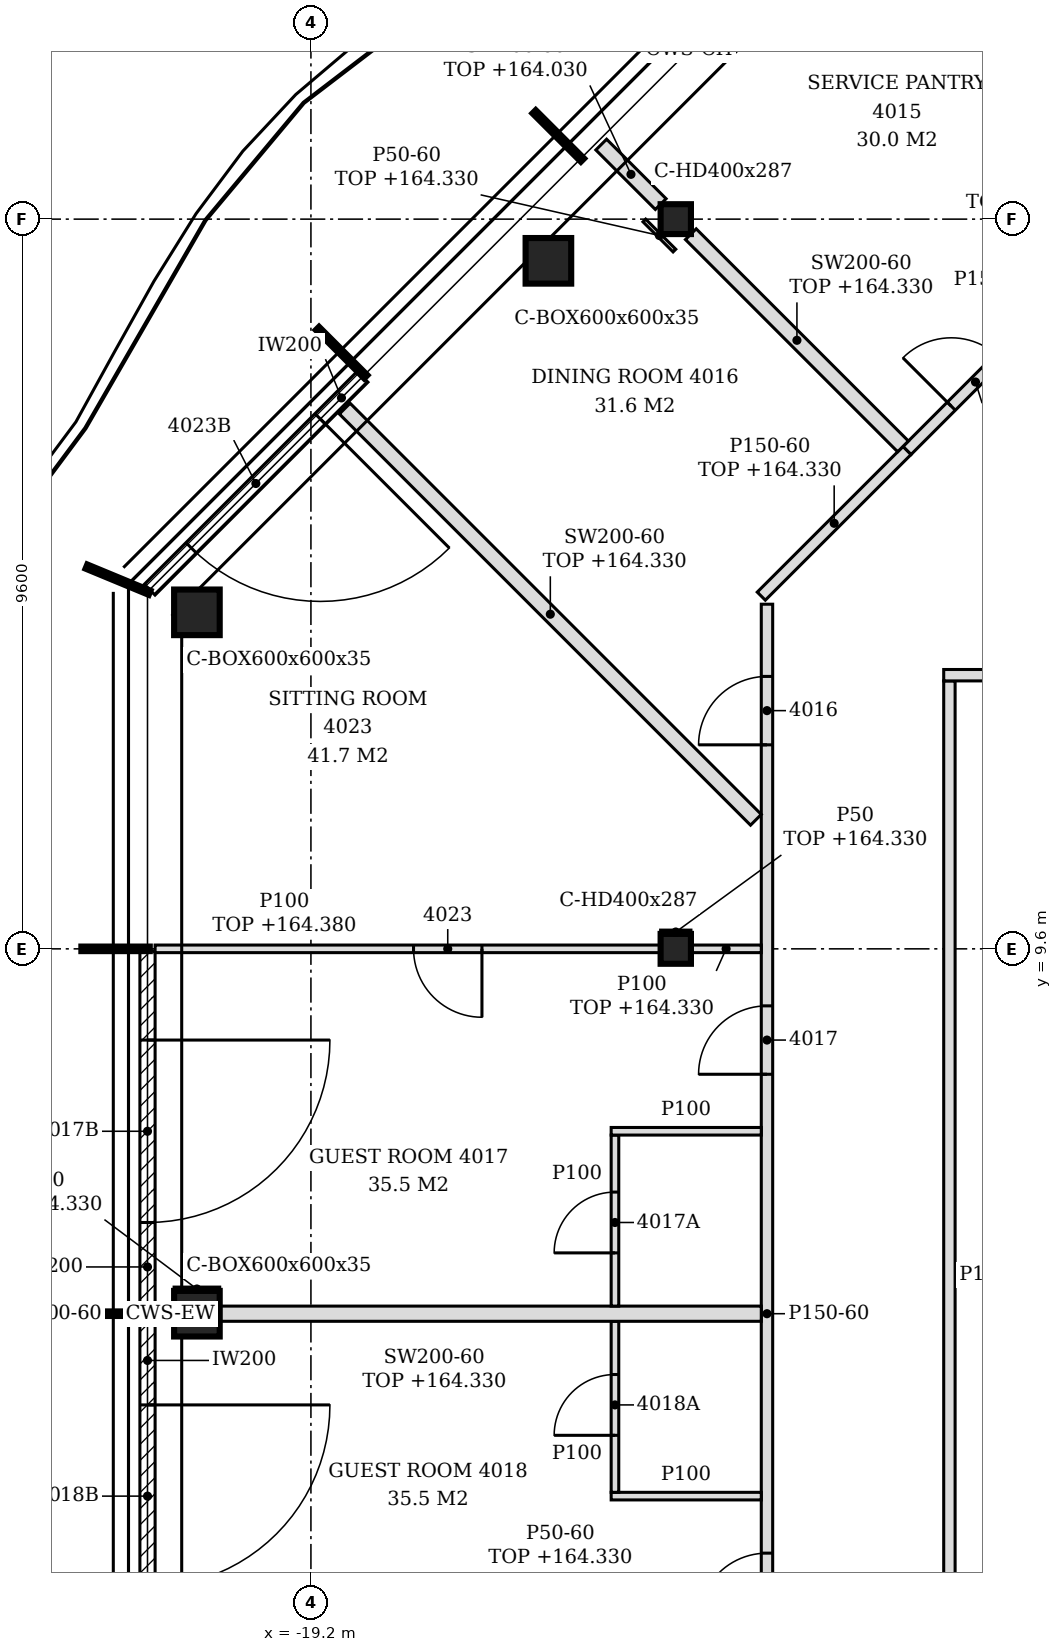
"""IFC4 building model, lengths in metres.
Left out: names, types, materials, properties, quantities, classifications, styles, units other than length and angle.
Written with IfcOpenShell. Run it as: python <this file> out.ifc"""

import sys

from ifc_helpers import new_model, si_unit, direction, frame, frame_2d, origin, origin_2d, place, context, subcontext, project, spatial, polyline, rectangle, hollow_rectangle, i_section, outline, extrude, element, fill, save


model = new_model("IFC4")
c1 = context("Model", 3, precision=1e-05, world=origin(), true_north=direction((0.0, 1.0)))
c2 = subcontext(c1, "Body", "Model", "MODEL_VIEW")
j1 = project(units=[si_unit("LENGTHUNIT", "METRE"), si_unit("PLANEANGLEUNIT", "RADIAN")], contexts=[c1])
p1 = place(None, origin())
s1 = spatial("IfcSite", under=j1, at=p1, CompositionType="ELEMENT")
p2 = place(p1, origin())
s2 = spatial("IfcBuilding", under=s1, at=p2, CompositionType="ELEMENT")
p3 = place(p2, frame((0.0, 0.0, 161.4)))
s3 = spatial("IfcBuildingStorey", under=s2, at=p3, CompositionType="ELEMENT", Elevation=161.4)
for number, where, z_axis, x_axis in (
    (1, (-16.076, 18.652, -0.15), (0.0, 0.0, 1.0), (1.0, 0.0, 0.0)),
    (2, (-20.7, 14.027, -0.15), (0.0, 0.0, 1.0), (1.0, 0.0, 0.0)),
    (3, (-20.7, 4.8, -0.15), (0.0, 0.0, 1.0), (1.0, 0.0, 0.0)),
):
    element("IfcColumn", number, at=place(p3, frame(where, z_axis=z_axis, x_axis=x_axis)), inside=s3, PredefinedType="COLUMN", context=c2, shape_type="SweptSolid", body=[
        extrude(hollow_rectangle(XDim=0.6, YDim=0.6, WallThickness=0.035, at=origin_2d()), origin(), (0.0, 0.0, 1.0), 3.6),
    ])
for number, where, z_axis, x_axis in (
    (4, (-14.4, 9.6, -0.15), (0.0, 0.0, 1.0), (1.0, 0.0, 0.0)),
    (5, (-14.4, 19.2, -0.15), (0.0, 0.0, 1.0), (1.0, 0.0, 0.0)),
):
    element("IfcColumn", number, at=place(p3, frame(where, z_axis=z_axis, x_axis=x_axis)), inside=s3, PredefinedType="COLUMN", context=c2, shape_type="SweptSolid", body=[
        extrude(i_section(OverallWidth=0.399, OverallDepth=0.393, WebThickness=0.023, FlangeThickness=0.037, FilletRadius=0.015, at=origin_2d()), origin(), (0.0, 0.0, 1.0), 3.6),
    ])
p4 = place(p3, frame((-18.521, 17.126, 0.0), z_axis=(0.0, 0.0, 1.0), x_axis=(-0.707106781187, -0.707106781187, 0.0)))
e6 = element("IfcWall", 6, at=p4, inside=s3, PredefinedType="NOTDEFINED", context=c2, shape_type="SweptSolid", body=[
    extrude(rectangle(XDim=3.962, YDim=0.2, at=frame_2d((1.981, 0.0))), origin(), (0.0, 0.0, 1.0), 3.45),
])
p5 = place(p4, frame((0.785, 0.0, 0.0)))
e7 = element("IfcOpeningElement", 7, at=p5, cuts=e6, PredefinedType="OPENING", context=c2, shape_type="SweptSolid", body=[
    extrude(rectangle(XDim=2.4, YDim=2.4, at=frame_2d((1.2, 1.2))), frame((0.0, 0.11, 0.0), z_axis=(0.0, -1.0, 0.0), x_axis=(1.0, 0.0, 0.0)), (0.0, 0.0, 1.0), 0.22),
])
p6 = place(p3, frame((-21.35, 9.57, 0.0), z_axis=(0.0, 0.0, 1.0), x_axis=(0.0, -1.0, 0.0)))
e8 = element("IfcWall", 8, at=p6, inside=s3, PredefinedType="NOTDEFINED", context=c2, shape_type="SweptSolid", body=[
    extrude(rectangle(XDim=4.74, YDim=0.2, at=frame_2d((2.37, 0.0))), origin(), (0.0, 0.0, 1.0), 3.45),
])
p7 = place(p6, frame((1.17, 0.0, 0.0)))
e9 = element("IfcOpeningElement", 9, at=p7, cuts=e8, PredefinedType="OPENING", context=c2, shape_type="SweptSolid", body=[
    extrude(rectangle(XDim=2.4, YDim=2.4, at=frame_2d((1.2, 1.2))), frame((0.0, 0.11, 0.0), z_axis=(0.0, -1.0, 0.0), x_axis=(1.0, 0.0, 0.0)), (0.0, 0.0, 1.0), 0.22),
])
p8 = place(p3, frame((-21.35, 4.77, 0.0), z_axis=(0.0, 0.0, 1.0), x_axis=(0.0, -1.0, 0.0)))
e10 = element("IfcWall", 10, at=p8, inside=s3, PredefinedType="NOTDEFINED", context=c2, shape_type="SweptSolid", body=[
    extrude(rectangle(XDim=4.74, YDim=0.2, at=frame_2d((2.37, 0.0))), origin(), (0.0, 0.0, 1.0), 3.45),
])
p9 = place(p8, frame((1.17, 0.0, 0.0)))
e11 = element("IfcOpeningElement", 11, at=p9, cuts=e10, PredefinedType="OPENING", context=c2, shape_type="SweptSolid", body=[
    extrude(rectangle(XDim=2.4, YDim=2.4, at=frame_2d((1.2, 1.2))), frame((0.0, 0.11, 0.0), z_axis=(0.0, -1.0, 0.0), x_axis=(1.0, 0.0, 0.0)), (0.0, 0.0, 1.0), 0.22),
])
p10 = place(p3, frame((-13.2, -3.5, 0.0), z_axis=(0.0, 0.0, 1.0), x_axis=(0.0, 1.0, 0.0)))
e12 = element("IfcWall", 12, at=p10, inside=s3, PredefinedType="PARTITIONING", context=c2, shape_type="SweptSolid", body=[
    extrude(outline(polyline([(0.0, 0.0), (17.634, 0.0), (17.634, 3.45), (13.2, 3.45), (13.198, 2.93), (13.0, 2.93), (12.998, 3.45), (8.4, 3.45), (8.398, 2.93), (8.2, 2.93), (8.198, 3.45), (3.6, 3.45), (3.598, 2.93), (3.4, 2.93), (3.398, 3.45), (0.0, 3.45), (0.0, 0.0)])), frame((0.0, 0.075, 0.0), z_axis=(0.0, -1.0, 0.0), x_axis=(1.0, 0.0, 0.0)), (0.0, 0.0, 1.0), 0.15),
])
p11 = place(p10, frame((15.784, 0.0, 0.0)))
e13 = element("IfcOpeningElement", 13, at=p11, cuts=e12, PredefinedType="OPENING", context=c2, shape_type="SweptSolid", body=[
    extrude(rectangle(XDim=0.9, YDim=2.1, at=frame_2d((0.45, 1.05))), frame((0.0, 0.085, 0.0), z_axis=(0.0, -1.0, 0.0), x_axis=(1.0, 0.0, 0.0)), (0.0, 0.0, 1.0), 0.17),
])
p12 = place(p10, frame((11.45, 0.0, 0.0)))
e14 = element("IfcOpeningElement", 14, at=p12, cuts=e12, PredefinedType="OPENING", context=c2, shape_type="SweptSolid", body=[
    extrude(rectangle(XDim=0.9, YDim=2.1, at=frame_2d((0.45, 1.05))), frame((0.0, 0.085, 0.0), z_axis=(0.0, -1.0, 0.0), x_axis=(1.0, 0.0, 0.0)), (0.0, 0.0, 1.0), 0.17),
])
p13 = place(p10, frame((4.25, 0.0, 0.0)))
e15 = element("IfcOpeningElement", 15, at=p13, cuts=e12, PredefinedType="OPENING", context=c2, shape_type="SweptSolid", body=[
    extrude(rectangle(XDim=0.9, YDim=2.1, at=frame_2d((0.45, 1.05))), frame((0.0, 0.085, 0.0), z_axis=(0.0, -1.0, 0.0), x_axis=(1.0, 0.0, 0.0)), (0.0, 0.0, 1.0), 0.17),
])
p14 = place(p10, frame((1.353, 0.0, 0.0)))
e16 = element("IfcOpeningElement", 16, at=p14, cuts=e12, PredefinedType="OPENING", context=c2, shape_type="SweptSolid", body=[
    extrude(rectangle(XDim=0.9, YDim=2.1, at=frame_2d((0.45, 1.05))), frame((0.0, 0.085, 0.0), z_axis=(0.0, -1.0, 0.0), x_axis=(1.0, 0.0, 0.0)), (0.0, 0.0, 1.0), 0.17),
])
p15 = place(p3, frame((-10.8, -2.506, 0.0), z_axis=(0.0, 0.0, 1.0), x_axis=(0.0, 1.0, 0.0)))
e17 = element("IfcWall", 17, at=p15, inside=s3, PredefinedType="PARTITIONING", context=c2, shape_type="SweptSolid", body=[
    extrude(outline(polyline([(0.0, 0.0), (15.631, 0.0), (15.631, 3.45), (12.206, 3.45), (12.204, 2.93), (12.006, 2.93), (12.004, 3.45), (7.406, 3.45), (7.404, 2.93), (7.206, 2.93), (7.204, 3.45), (2.606, 3.45), (2.604, 2.93), (2.406, 2.93), (2.404, 3.45), (0.0, 3.45), (0.0, 0.0)])), frame((0.0, 0.075, 0.0), z_axis=(0.0, -1.0, 0.0), x_axis=(1.0, 0.0, 0.0)), (0.0, 0.0, 1.0), 0.15),
])
p16 = place(p3, frame((-15.25, 2.4, 0.0), z_axis=(0.0, 0.0, 1.0), x_axis=(1.0, 0.0, 0.0)))
e18 = element("IfcWall", 18, at=p16, inside=s3, PredefinedType="PARTITIONING", context=c2, shape_type="SweptSolid", body=[
    extrude(outline(polyline([(0.0, 0.0), (1.975, 0.0), (1.975, 3.45), (1.0, 3.45), (0.998, 2.93), (0.7, 2.93), (0.698, 3.45), (0.0, 3.45), (0.0, 0.0)])), frame((0.0, 0.05, 0.0), z_axis=(0.0, -1.0, 0.0), x_axis=(1.0, 0.0, 0.0)), (0.0, 0.0, 1.0), 0.1),
])
p17 = place(p3, frame((-15.2, 2.45, 0.0), z_axis=(0.0, 0.0, 1.0), x_axis=(0.0, 1.0, 0.0)))
e19 = element("IfcWall", 19, at=p17, inside=s3, PredefinedType="PARTITIONING", context=c2, shape_type="SweptSolid", body=[
    extrude(rectangle(XDim=2.25, YDim=0.1, at=frame_2d((1.125, 0.0))), origin(), (0.0, 0.0, 1.0), 3.45),
])
p18 = place(p17, frame((0.75, 0.0, 0.0)))
e20 = element("IfcOpeningElement", 20, at=p18, cuts=e19, PredefinedType="OPENING", context=c2, shape_type="SweptSolid", body=[
    extrude(rectangle(XDim=0.8, YDim=2.1, at=frame_2d((0.4, 1.05))), frame((0.0, 0.06, 0.0), z_axis=(0.0, -1.0, 0.0), x_axis=(1.0, 0.0, 0.0)), (0.0, 0.0, 1.0), 0.12),
])
p19 = place(p3, frame((-21.25, 4.8, 0.0), z_axis=(0.0, 0.0, 1.0), x_axis=(1.0, 0.0, 0.0)))
e21 = element("IfcWall", 21, at=p19, inside=s3, PredefinedType="PARTITIONING", context=c2, shape_type="SweptSolid", body=[
    extrude(rectangle(XDim=0.25, YDim=0.2, at=frame_2d((0.125, 0.0))), origin(), (0.0, 0.0, 1.0), 3.45),
])
p20 = place(p3, frame((-20.4, 4.8, 0.0), z_axis=(0.0, 0.0, 1.0), x_axis=(1.0, 0.0, 0.0)))
e22 = element("IfcWall", 22, at=p20, inside=s3, PredefinedType="PARTITIONING", context=c2, shape_type="SweptSolid", body=[
    extrude(rectangle(XDim=7.125, YDim=0.2, at=frame_2d((3.562, 0.0))), origin(), (0.0, 0.0, 1.0), 2.93),
])
p21 = place(p3, frame((-15.2, 4.9, 0.0), z_axis=(0.0, 0.0, 1.0), x_axis=(0.0, 1.0, 0.0)))
e23 = element("IfcWall", 23, at=p21, inside=s3, PredefinedType="PARTITIONING", context=c2, shape_type="SweptSolid", body=[
    extrude(rectangle(XDim=2.25, YDim=0.1, at=frame_2d((1.125, 0.0))), origin(), (0.0, 0.0, 1.0), 3.45),
])
p22 = place(p21, frame((0.7, 0.0, 0.0)))
e24 = element("IfcOpeningElement", 24, at=p22, cuts=e23, PredefinedType="OPENING", context=c2, shape_type="SweptSolid", body=[
    extrude(rectangle(XDim=0.8, YDim=2.1, at=frame_2d((0.4, 1.05))), frame((0.0, 0.06, 0.0), z_axis=(0.0, -1.0, 0.0), x_axis=(1.0, 0.0, 0.0)), (0.0, 0.0, 1.0), 0.12),
])
p23 = place(p3, frame((-15.25, 7.2, 0.0), z_axis=(0.0, 0.0, 1.0), x_axis=(1.0, 0.0, 0.0)))
e25 = element("IfcWall", 25, at=p23, inside=s3, PredefinedType="PARTITIONING", context=c2, shape_type="SweptSolid", body=[
    extrude(outline(polyline([(0.0, 0.0), (1.975, 0.0), (1.975, 3.45), (1.0, 3.45), (0.998, 2.93), (0.7, 2.93), (0.698, 3.45), (0.0, 3.45), (0.0, 0.0)])), frame((0.0, 0.05, 0.0), z_axis=(0.0, -1.0, 0.0), x_axis=(1.0, 0.0, 0.0)), (0.0, 0.0, 1.0), 0.1),
])
p24 = place(p3, frame((-21.25, 9.6, 0.0), z_axis=(0.0, 0.0, 1.0), x_axis=(1.0, 0.0, 0.0)))
e26 = element("IfcWall", 26, at=p24, inside=s3, PredefinedType="PARTITIONING", context=c2, shape_type="SweptSolid", body=[
    extrude(outline(polyline([(0.0, 0.0), (6.65, 0.0), (6.65, 2.98), (0.7, 2.98), (0.698, 2.93), (0.4, 2.93), (0.398, 2.98), (0.0, 2.98), (0.0, 0.0)])), frame((0.0, 0.05, 0.0), z_axis=(0.0, -1.0, 0.0), x_axis=(1.0, 0.0, 0.0)), (0.0, 0.0, 1.0), 0.1),
])
p25 = place(p24, frame((3.4, 0.0, 0.0)))
e27 = element("IfcOpeningElement", 27, at=p25, cuts=e26, PredefinedType="OPENING", context=c2, shape_type="SweptSolid", body=[
    extrude(rectangle(XDim=0.9, YDim=2.1, at=frame_2d((0.45, 1.05))), frame((0.0, 0.06, 0.0), z_axis=(0.0, -1.0, 0.0), x_axis=(1.0, 0.0, 0.0)), (0.0, 0.0, 1.0), 0.12),
])
p26 = place(p3, frame((-14.2, 9.6, 0.0), z_axis=(0.0, 0.0, 1.0), x_axis=(1.0, 0.0, 0.0)))
e28 = element("IfcWall", 28, at=p26, inside=s3, PredefinedType="PARTITIONING", context=c2, shape_type="SweptSolid", body=[
    extrude(rectangle(XDim=0.926, YDim=0.1, at=frame_2d((0.463, 0.0))), origin(), (0.0, 0.0, 1.0), 2.93),
])
p27 = place(p3, frame((-13.346, 11.298, 0.0), z_axis=(0.0, 0.0, 1.0), x_axis=(-0.707106781187, 0.707106781187, 0.0)))
e29 = element("IfcWall", 29, at=p27, inside=s3, PredefinedType="PARTITIONING", context=c2, shape_type="SweptSolid", body=[
    extrude(rectangle(XDim=7.65, YDim=0.2, at=frame_2d((3.825, 0.0))), origin(), (0.0, 0.0, 1.0), 2.93),
])
p28 = place(p3, frame((-10.875, 13.2, 0.0), z_axis=(0.0, 0.0, 1.0), x_axis=(1.0, 0.0, 0.0)))
e30 = element("IfcWall", 30, at=p28, inside=s3, PredefinedType="PARTITIONING", context=c2, shape_type="SweptSolid", body=[
    extrude(rectangle(XDim=4.06, YDim=0.15, at=frame_2d((2.03, 0.0))), origin(), (0.0, 0.0, 1.0), 3.45),
])
p29 = place(p3, frame((-13.275, 14.24, 0.0), z_axis=(0.0, 0.0, 1.0), x_axis=(0.707286821097, 0.706926695424, 0.0)))
e31 = element("IfcWall", 31, at=p29, inside=s3, PredefinedType="PARTITIONING", context=c2, shape_type="SweptSolid", body=[
    extrude(rectangle(XDim=2.712, YDim=0.15, at=frame_2d((1.356, 0.0))), origin(), (0.0, 0.0, 1.0), 2.93),
])
p30 = place(p3, frame((-11.357, 16.157, 0.0), z_axis=(0.0, 0.0, 1.0), x_axis=(0.707106781187, 0.707106781187, 0.0)))
e32 = element("IfcWall", 32, at=p30, inside=s3, PredefinedType="PARTITIONING", context=c2, shape_type="SweptSolid", body=[
    extrude(rectangle(XDim=3.071, YDim=0.15, at=frame_2d((1.535, 0.0))), origin(), (0.0, 0.0, 1.0), 3.45),
])
p31 = place(p30, frame((0.823, 0.0, 0.0)))
e33 = element("IfcOpeningElement", 33, at=p31, cuts=e32, PredefinedType="OPENING", context=c2, shape_type="SweptSolid", body=[
    extrude(rectangle(XDim=0.9, YDim=2.1, at=frame_2d((0.45, 1.05))), frame((0.0, 0.085, 0.0), z_axis=(0.0, -1.0, 0.0), x_axis=(1.0, 0.0, 0.0)), (0.0, 0.0, 1.0), 0.17),
])
p32 = place(p3, frame((-11.41, 16.21, 0.0), z_axis=(0.0, 0.0, 1.0), x_axis=(-0.707106781187, 0.707106781187, 0.0)))
e34 = element("IfcWall", 34, at=p32, inside=s3, PredefinedType="PARTITIONING", context=c2, shape_type="SweptSolid", body=[
    extrude(rectangle(XDim=3.948, YDim=0.2, at=frame_2d((1.974, 0.0))), origin(), (0.0, 0.0, 1.0), 2.93),
])
p33 = place(p3, frame((-7.522, 19.346, 0.0), z_axis=(0.0, 0.0, 1.0), x_axis=(-0.707106781187, 0.707106781187, 0.0)))
e35 = element("IfcWall", 35, at=p33, inside=s3, PredefinedType="PARTITIONING", context=c2, shape_type="SweptSolid", body=[
    extrude(rectangle(XDim=5.134, YDim=0.2, at=frame_2d((2.567, 0.0))), origin(), (0.0, 0.0, 1.0), 2.93),
])
p34 = place(p3, frame((-14.598, 19.398, 0.0), z_axis=(0.0, 0.0, 1.0), x_axis=(-0.707106781187, 0.707106781187, 0.0)))
e36 = element("IfcWall", 36, at=p34, inside=s3, PredefinedType="PARTITIONING", context=c2, shape_type="SweptSolid", body=[
    extrude(rectangle(XDim=1.107, YDim=0.2, at=frame_2d((0.554, 0.0))), origin(), (0.0, 0.0, 1.0), 2.63),
])
p35 = place(p3, frame((-21.0, 5.125, 0.0), z_axis=(0.0, 0.0, 1.0), x_axis=(1.0, 0.0, 0.0)))
e37 = element("IfcWall", 37, at=p35, inside=s3, PredefinedType="PARTITIONING", context=c2, shape_type="SweptSolid", body=[
    extrude(rectangle(XDim=0.6, YDim=0.05, at=frame_2d((0.3, 0.0))), origin(), (0.0, 0.0, 1.0), 2.93),
])
p36 = place(p3, frame((-14.6, 9.822, 0.0), z_axis=(0.0, 0.0, 1.0), x_axis=(1.0, 0.0, 0.0)))
e38 = element("IfcWall", 38, at=p36, inside=s3, PredefinedType="PARTITIONING", context=c2, shape_type="SweptSolid", body=[
    extrude(rectangle(XDim=0.399, YDim=0.05, at=frame_2d((0.2, 0.0))), origin(), (0.0, 0.0, 1.0), 2.93),
])
p37 = place(p3, frame((-14.418, 18.786, 0.0), z_axis=(0.0, 0.0, 1.0), x_axis=(-0.707106781187, 0.707106781187, 0.0)))
e39 = element("IfcWall", 39, at=p37, inside=s3, PredefinedType="PARTITIONING", context=c2, shape_type="SweptSolid", body=[
    extrude(rectangle(XDim=0.56, YDim=0.05, at=frame_2d((0.28, 0.0))), origin(), (0.0, 0.0, 1.0), 2.93),
])
p38 = place(p5, origin())
e40 = element("IfcDoor", 40, at=p38, inside=s3, OperationType="SINGLE_SWING_LEFT", PredefinedType="DOOR", context=c2, shape_type="SweptSolid", body=[
    extrude(rectangle(XDim=2.4, YDim=2.4, at=frame_2d((1.2, 1.2))), frame((0.0, 0.025, 0.0), z_axis=(0.0, -1.0, 0.0), x_axis=(1.0, 0.0, 0.0)), (0.0, 0.0, 1.0), 0.05),
])
fill(e7, e40)
p39 = place(p7, origin())
e41 = element("IfcDoor", 41, at=p39, inside=s3, OperationType="SINGLE_SWING_LEFT", PredefinedType="DOOR", context=c2, shape_type="SweptSolid", body=[
    extrude(rectangle(XDim=2.4, YDim=2.4, at=frame_2d((1.2, 1.2))), frame((0.0, 0.025, 0.0), z_axis=(0.0, -1.0, 0.0), x_axis=(1.0, 0.0, 0.0)), (0.0, 0.0, 1.0), 0.05),
])
fill(e9, e41)
p40 = place(p9, origin())
e42 = element("IfcDoor", 42, at=p40, inside=s3, OperationType="SINGLE_SWING_LEFT", PredefinedType="DOOR", context=c2, shape_type="SweptSolid", body=[
    extrude(rectangle(XDim=2.4, YDim=2.4, at=frame_2d((1.2, 1.2))), frame((0.0, 0.025, 0.0), z_axis=(0.0, -1.0, 0.0), x_axis=(1.0, 0.0, 0.0)), (0.0, 0.0, 1.0), 0.05),
])
fill(e11, e42)
p41 = place(p31, origin())
e43 = element("IfcDoor", 43, at=p41, inside=s3, OperationType="SINGLE_SWING_LEFT", PredefinedType="DOOR", context=c2, shape_type="SweptSolid", body=[
    extrude(rectangle(XDim=0.9, YDim=2.1, at=frame_2d((0.45, 1.05))), frame((0.0, 0.025, 0.0), z_axis=(0.0, -1.0, 0.0), x_axis=(1.0, 0.0, 0.0)), (0.0, 0.0, 1.0), 0.05),
])
fill(e33, e43)
p42 = place(p11, origin())
e44 = element("IfcDoor", 44, at=p42, inside=s3, OperationType="SINGLE_SWING_LEFT", PredefinedType="DOOR", context=c2, shape_type="SweptSolid", body=[
    extrude(rectangle(XDim=0.9, YDim=2.1, at=frame_2d((0.45, 1.05))), frame((0.0, 0.025, 0.0), z_axis=(0.0, -1.0, 0.0), x_axis=(1.0, 0.0, 0.0)), (0.0, 0.0, 1.0), 0.05),
])
fill(e13, e44)
p43 = place(p12, origin())
e45 = element("IfcDoor", 45, at=p43, inside=s3, OperationType="SINGLE_SWING_LEFT", PredefinedType="DOOR", context=c2, shape_type="SweptSolid", body=[
    extrude(rectangle(XDim=0.9, YDim=2.1, at=frame_2d((0.45, 1.05))), frame((0.0, 0.025, 0.0), z_axis=(0.0, -1.0, 0.0), x_axis=(1.0, 0.0, 0.0)), (0.0, 0.0, 1.0), 0.05),
])
fill(e14, e45)
p44 = place(p22, origin())
e46 = element("IfcDoor", 46, at=p44, inside=s3, OperationType="SINGLE_SWING_LEFT", PredefinedType="DOOR", context=c2, shape_type="SweptSolid", body=[
    extrude(rectangle(XDim=0.8, YDim=2.1, at=frame_2d((0.4, 1.05))), frame((0.0, 0.025, 0.0), z_axis=(0.0, -1.0, 0.0), x_axis=(1.0, 0.0, 0.0)), (0.0, 0.0, 1.0), 0.05),
])
fill(e24, e46)
p45 = place(p13, origin())
e47 = element("IfcDoor", 47, at=p45, inside=s3, OperationType="SINGLE_SWING_LEFT", PredefinedType="DOOR", context=c2, shape_type="SweptSolid", body=[
    extrude(rectangle(XDim=0.9, YDim=2.1, at=frame_2d((0.45, 1.05))), frame((0.0, 0.025, 0.0), z_axis=(0.0, -1.0, 0.0), x_axis=(1.0, 0.0, 0.0)), (0.0, 0.0, 1.0), 0.05),
])
fill(e15, e47)
p46 = place(p18, origin())
e48 = element("IfcDoor", 48, at=p46, inside=s3, OperationType="SINGLE_SWING_LEFT", PredefinedType="DOOR", context=c2, shape_type="SweptSolid", body=[
    extrude(rectangle(XDim=0.8, YDim=2.1, at=frame_2d((0.4, 1.05))), frame((0.0, 0.025, 0.0), z_axis=(0.0, -1.0, 0.0), x_axis=(1.0, 0.0, 0.0)), (0.0, 0.0, 1.0), 0.05),
])
fill(e20, e48)
p47 = place(p25, frame((0.9, 0.0, 0.0), z_axis=(0.0, 0.0, 1.0), x_axis=(-1.0, 0.0, 0.0)))
e49 = element("IfcDoor", 49, at=p47, inside=s3, OperationType="SINGLE_SWING_LEFT", PredefinedType="DOOR", context=c2, shape_type="SweptSolid", body=[
    extrude(rectangle(XDim=0.9, YDim=2.1, at=frame_2d((0.45, 1.05))), frame((0.0, 0.025, 0.0), z_axis=(0.0, -1.0, 0.0), x_axis=(1.0, 0.0, 0.0)), (0.0, 0.0, 1.0), 0.05),
])
fill(e27, e49)
save(model, sys.argv[1])
